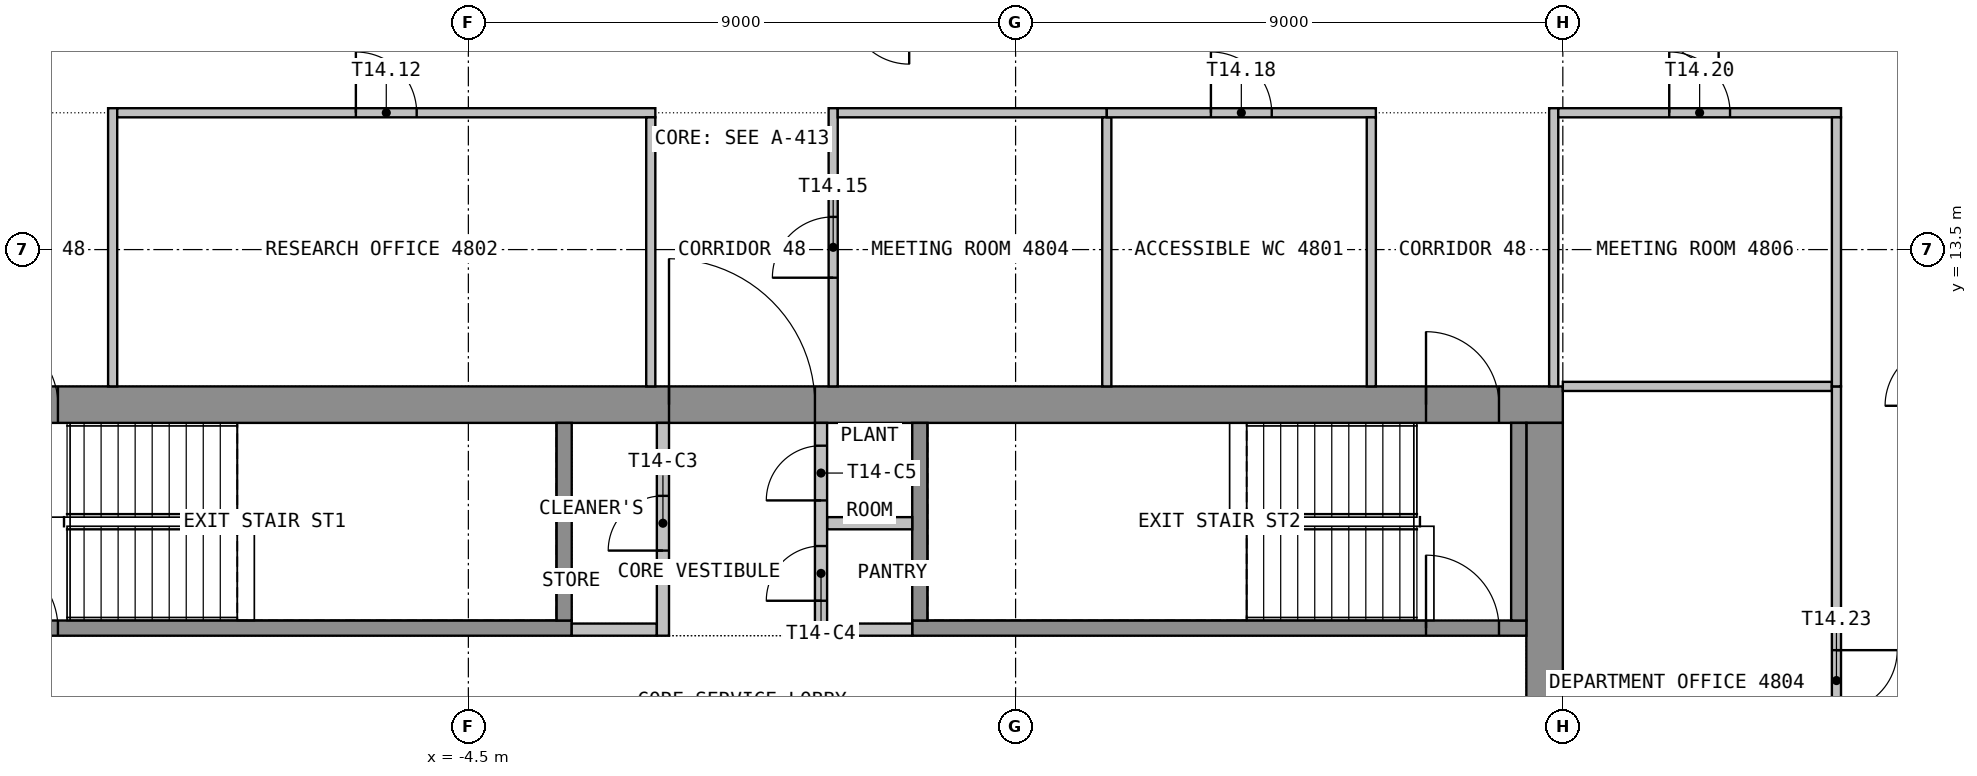
"""IFC4 building model, lengths in metres.
Left out: names, types, materials, properties, quantities, classifications, styles, units other than length and angle.
Written with IfcOpenShell. Run it as: python <this file> out.ifc"""

import sys

from ifc_helpers import new_model, si_unit, direction, frame, frame_2d, origin, place, context, subcontext, project, spatial, rectangle, extrude, element, fill, save


model = new_model("IFC4")
c1 = context("Model", 3, precision=1e-05, world=origin(), true_north=direction((0.0, 1.0)))
c2 = subcontext(c1, "Body", "Model", "MODEL_VIEW")
j1 = project(units=[si_unit("LENGTHUNIT", "METRE"), si_unit("PLANEANGLEUNIT", "RADIAN")], contexts=[c1])
p1 = place(None, origin())
s1 = spatial("IfcSite", under=j1, at=p1, CompositionType="ELEMENT")
p2 = place(p1, origin())
s2 = spatial("IfcBuilding", under=s1, at=p2, CompositionType="ELEMENT")
p3 = place(p2, frame((0.0, 0.0, 195.6)))
s3 = spatial("IfcBuildingStorey", under=s2, at=p3, CompositionType="ELEMENT", Elevation=195.6)
p4 = place(p3, frame((-13.5, 10.95, 0.0), z_axis=(0.0, 0.0, 1.0), x_axis=(1.0, 0.0, 0.0)))
e1 = element("IfcWall", 1, at=p4, inside=s3, PredefinedType="SHEAR", context=c2, shape_type="SweptSolid", body=[
    extrude(rectangle(XDim=27.0, YDim=0.6, at=frame_2d((13.5, 0.0))), origin(), (0.0, 0.0, 1.0), 3.55),
])
p5 = place(p4, frame((12.3, 0.0, 0.0)))
e2 = element("IfcOpeningElement", 2, at=p5, cuts=e1, PredefinedType="OPENING", context=c2, shape_type="SweptSolid", body=[
    extrude(rectangle(XDim=2.4, YDim=2.1, at=frame_2d((1.2, 1.05))), frame((0.0, 0.31, 0.0), z_axis=(0.0, -1.0, 0.0), x_axis=(1.0, 0.0, 0.0)), (0.0, 0.0, 1.0), 0.62),
])
p6 = place(p4, frame((1.05, 0.0, 0.0)))
e3 = element("IfcOpeningElement", 3, at=p6, cuts=e1, PredefinedType="OPENING", context=c2, shape_type="SweptSolid", body=[
    extrude(rectangle(XDim=1.2, YDim=2.1, at=frame_2d((0.6, 1.05))), frame((0.0, 0.31, 0.0), z_axis=(0.0, -1.0, 0.0), x_axis=(1.0, 0.0, 0.0)), (0.0, 0.0, 1.0), 0.62),
])
p7 = place(p4, frame((24.75, 0.0, 0.0)))
e4 = element("IfcOpeningElement", 4, at=p7, cuts=e1, PredefinedType="OPENING", context=c2, shape_type="SweptSolid", body=[
    extrude(rectangle(XDim=1.2, YDim=2.1, at=frame_2d((0.6, 1.05))), frame((0.0, 0.31, 0.0), z_axis=(0.0, -1.0, 0.0), x_axis=(1.0, 0.0, 0.0)), (0.0, 0.0, 1.0), 0.62),
])
p8 = place(p3, frame((13.2, -10.65, 0.0), z_axis=(0.0, 0.0, 1.0), x_axis=(0.0, 1.0, 0.0)))
e5 = element("IfcWall", 5, at=p8, inside=s3, PredefinedType="SHEAR", context=c2, shape_type="SweptSolid", body=[
    extrude(rectangle(XDim=21.3, YDim=0.6, at=frame_2d((10.65, 0.0))), origin(), (0.0, 0.0, 1.0), 3.55),
])
p9 = place(p8, frame((9.45, 0.0, 0.0)))
e6 = element("IfcOpeningElement", 6, at=p9, cuts=e5, PredefinedType="OPENING", context=c2, shape_type="SweptSolid", body=[
    extrude(rectangle(XDim=2.4, YDim=2.1, at=frame_2d((1.2, 1.05))), frame((0.0, 0.31, 0.0), z_axis=(0.0, -1.0, 0.0), x_axis=(1.0, 0.0, 0.0)), (0.0, 0.0, 1.0), 0.62),
])
p10 = place(p3, frame((-12.9, 7.275, 0.0), z_axis=(0.0, 0.0, 1.0), x_axis=(1.0, 0.0, 0.0)))
e7 = element("IfcWall", 7, at=p10, inside=s3, PredefinedType="SHEAR", context=c2, shape_type="SweptSolid", body=[
    extrude(rectangle(XDim=10.1, YDim=0.25, at=frame_2d((5.05, 0.0))), origin(), (0.0, 0.0, 1.0), 3.55),
])
p11 = place(p10, frame((0.45, 0.0, 0.0)))
e8 = element("IfcOpeningElement", 8, at=p11, cuts=e7, PredefinedType="OPENING", context=c2, shape_type="SweptSolid", body=[
    extrude(rectangle(XDim=1.2, YDim=2.1, at=frame_2d((0.6, 1.05))), frame((0.0, 0.135, 0.0), z_axis=(0.0, -1.0, 0.0), x_axis=(1.0, 0.0, 0.0)), (0.0, 0.0, 1.0), 0.27),
])
p12 = place(p3, frame((-2.925, 7.4, 0.0), z_axis=(0.0, 0.0, 1.0), x_axis=(0.0, 1.0, 0.0)))
e9 = element("IfcWall", 9, at=p12, inside=s3, PredefinedType="SHEAR", context=c2, shape_type="SweptSolid", body=[
    extrude(rectangle(XDim=3.25, YDim=0.25, at=frame_2d((1.625, 0.0))), origin(), (0.0, 0.0, 1.0), 3.55),
])
p13 = place(p3, frame((2.8, 7.275, 0.0), z_axis=(0.0, 0.0, 1.0), x_axis=(1.0, 0.0, 0.0)))
e10 = element("IfcWall", 10, at=p13, inside=s3, PredefinedType="SHEAR", context=c2, shape_type="SweptSolid", body=[
    extrude(rectangle(XDim=10.1, YDim=0.25, at=frame_2d((5.05, 0.0))), origin(), (0.0, 0.0, 1.0), 3.55),
])
p14 = place(p13, frame((8.45, 0.0, 0.0)))
e11 = element("IfcOpeningElement", 11, at=p14, cuts=e10, PredefinedType="OPENING", context=c2, shape_type="SweptSolid", body=[
    extrude(rectangle(XDim=1.2, YDim=2.1, at=frame_2d((0.6, 1.05))), frame((0.0, 0.135, 0.0), z_axis=(0.0, -1.0, 0.0), x_axis=(1.0, 0.0, 0.0)), (0.0, 0.0, 1.0), 0.27),
])
for number, where, z_axis, x_axis in (
    (12, (2.925, 7.4, 0.0), (0.0, 0.0, 1.0), (0.0, 1.0, 0.0)),
    (13, (12.775, 7.4, 0.0), (0.0, 0.0, 1.0), (0.0, 1.0, 0.0)),
):
    element("IfcWall", number, at=place(p3, frame(where, z_axis=z_axis, x_axis=x_axis)), inside=s3, PredefinedType="SHEAR", context=c2, shape_type="SweptSolid", body=[
        extrude(rectangle(XDim=3.25, YDim=0.25, at=frame_2d((1.625, 0.0))), origin(), (0.0, 0.0, 1.0), 3.55),
    ])
for number, where, z_axis, x_axis in (
    (14, (-2.8, 7.25, 0.0), (0.0, 0.0, 1.0), (1.0, 0.0, 0.0)),
    (15, (1.4, 7.25, 0.0), (0.0, 0.0, 1.0), (1.0, 0.0, 0.0)),
    (16, (1.4, 9.0, 0.0), (0.0, 0.0, 1.0), (1.0, 0.0, 0.0)),
):
    element("IfcWall", number, at=place(p3, frame(where, z_axis=z_axis, x_axis=x_axis)), inside=s3, PredefinedType="PARTITIONING", context=c2, shape_type="SweptSolid", body=[
        extrude(rectangle(XDim=1.4, YDim=0.2, at=frame_2d((0.7, 0.0))), origin(), (0.0, 0.0, 1.0), 3.55),
    ])
p15 = place(p3, frame((-1.3, 7.15, 0.0), z_axis=(0.0, 0.0, 1.0), x_axis=(0.0, 1.0, 0.0)))
e17 = element("IfcWall", 17, at=p15, inside=s3, PredefinedType="PARTITIONING", context=c2, shape_type="SweptSolid", body=[
    extrude(rectangle(XDim=3.5, YDim=0.2, at=frame_2d((1.75, 0.0))), origin(), (0.0, 0.0, 1.0), 3.55),
])
p16 = place(p15, frame((1.4, 0.0, 0.0)))
e18 = element("IfcOpeningElement", 18, at=p16, cuts=e17, PredefinedType="OPENING", context=c2, shape_type="SweptSolid", body=[
    extrude(rectangle(XDim=0.9, YDim=2.1, at=frame_2d((0.45, 1.05))), frame((0.0, 0.11, 0.0), z_axis=(0.0, -1.0, 0.0), x_axis=(1.0, 0.0, 0.0)), (0.0, 0.0, 1.0), 0.22),
])
p17 = place(p3, frame((1.3, 7.15, 0.0), z_axis=(0.0, 0.0, 1.0), x_axis=(0.0, 1.0, 0.0)))
e19 = element("IfcWall", 19, at=p17, inside=s3, PredefinedType="PARTITIONING", context=c2, shape_type="SweptSolid", body=[
    extrude(rectangle(XDim=3.5, YDim=0.2, at=frame_2d((1.75, 0.0))), origin(), (0.0, 0.0, 1.0), 3.55),
])
p18 = place(p17, frame((0.575, 0.0, 0.0)))
e20 = element("IfcOpeningElement", 20, at=p18, cuts=e19, PredefinedType="OPENING", context=c2, shape_type="SweptSolid", body=[
    extrude(rectangle(XDim=0.9, YDim=2.1, at=frame_2d((0.45, 1.05))), frame((0.0, 0.11, 0.0), z_axis=(0.0, -1.0, 0.0), x_axis=(1.0, 0.0, 0.0)), (0.0, 0.0, 1.0), 0.22),
])
p19 = place(p17, frame((2.225, 0.0, 0.0)))
e21 = element("IfcOpeningElement", 21, at=p19, cuts=e19, PredefinedType="OPENING", context=c2, shape_type="SweptSolid", body=[
    extrude(rectangle(XDim=0.9, YDim=2.1, at=frame_2d((0.45, 1.05))), frame((0.0, 0.11, 0.0), z_axis=(0.0, -1.0, 0.0), x_axis=(1.0, 0.0, 0.0)), (0.0, 0.0, 1.0), 0.22),
])
p20 = place(p3, frame((-10.35, 11.25, 0.0), z_axis=(0.0, 0.0, 1.0), x_axis=(0.0, 1.0, 0.0)))
e22 = element("IfcWall", 22, at=p20, inside=s3, PredefinedType="PARTITIONING", context=c2, shape_type="SweptSolid", body=[
    extrude(rectangle(XDim=4.575, YDim=0.15, at=frame_2d((2.288, 0.0))), origin(), (0.0, 0.0, 1.0), 3.55),
])
p21 = place(p3, frame((-10.275, 15.75, 0.0), z_axis=(0.0, 0.0, 1.0), x_axis=(1.0, 0.0, 0.0)))
e23 = element("IfcWall", 23, at=p21, inside=s3, PredefinedType="PARTITIONING", context=c2, shape_type="SweptSolid", body=[
    extrude(rectangle(XDim=8.85, YDim=0.15, at=frame_2d((4.425, 0.0))), origin(), (0.0, 0.0, 1.0), 3.55),
])
p22 = place(p21, frame((3.925, 0.0, 0.0)))
e24 = element("IfcOpeningElement", 24, at=p22, cuts=e23, PredefinedType="OPENING", context=c2, shape_type="SweptSolid", body=[
    extrude(rectangle(XDim=1.0, YDim=2.1, at=frame_2d((0.5, 1.05))), frame((0.0, 0.085, 0.0), z_axis=(0.0, -1.0, 0.0), x_axis=(1.0, 0.0, 0.0)), (0.0, 0.0, 1.0), 0.17),
])
p23 = place(p3, frame((-1.5, 15.675, 0.0), z_axis=(0.0, 0.0, 1.0), x_axis=(0.0, -1.0, 0.0)))
e25 = element("IfcWall", 25, at=p23, inside=s3, PredefinedType="PARTITIONING", context=c2, shape_type="SweptSolid", body=[
    extrude(rectangle(XDim=4.425, YDim=0.15, at=frame_2d((2.212, 0.0))), origin(), (0.0, 0.0, 1.0), 3.55),
])
p24 = place(p3, frame((1.5, 11.25, 0.0), z_axis=(0.0, 0.0, 1.0), x_axis=(0.0, 1.0, 0.0)))
e26 = element("IfcWall", 26, at=p24, inside=s3, PredefinedType="PARTITIONING", context=c2, shape_type="SweptSolid", body=[
    extrude(rectangle(XDim=4.575, YDim=0.15, at=frame_2d((2.288, 0.0))), origin(), (0.0, 0.0, 1.0), 3.55),
])
p25 = place(p24, frame((1.788, 0.0, 0.0)))
e27 = element("IfcOpeningElement", 27, at=p25, cuts=e26, PredefinedType="OPENING", context=c2, shape_type="SweptSolid", body=[
    extrude(rectangle(XDim=1.0, YDim=2.1, at=frame_2d((0.5, 1.05))), frame((0.0, 0.085, 0.0), z_axis=(0.0, -1.0, 0.0), x_axis=(1.0, 0.0, 0.0)), (0.0, 0.0, 1.0), 0.17),
])
for number, where, z_axis, x_axis in (
    (28, (1.575, 15.75, 0.0), (0.0, 0.0, 1.0), (1.0, 0.0, 0.0)),
    (29, (6.0, 15.675, 0.0), (0.0, 0.0, 1.0), (0.0, -1.0, 0.0)),
):
    element("IfcWall", number, at=place(p3, frame(where, z_axis=z_axis, x_axis=x_axis)), inside=s3, PredefinedType="PARTITIONING", context=c2, shape_type="SweptSolid", body=[
        extrude(rectangle(XDim=4.425, YDim=0.15, at=frame_2d((2.212, 0.0))), origin(), (0.0, 0.0, 1.0), 3.55),
    ])
p26 = place(p3, frame((6.0, 15.75, 0.0), z_axis=(0.0, 0.0, 1.0), x_axis=(1.0, 0.0, 0.0)))
e30 = element("IfcWall", 30, at=p26, inside=s3, PredefinedType="PARTITIONING", context=c2, shape_type="SweptSolid", body=[
    extrude(rectangle(XDim=4.425, YDim=0.15, at=frame_2d((2.212, 0.0))), origin(), (0.0, 0.0, 1.0), 3.55),
])
p27 = place(p26, frame((1.712, 0.0, 0.0)))
e31 = element("IfcOpeningElement", 31, at=p27, cuts=e30, PredefinedType="OPENING", context=c2, shape_type="SweptSolid", body=[
    extrude(rectangle(XDim=1.0, YDim=2.1, at=frame_2d((0.5, 1.05))), frame((0.0, 0.085, 0.0), z_axis=(0.0, -1.0, 0.0), x_axis=(1.0, 0.0, 0.0)), (0.0, 0.0, 1.0), 0.17),
])
p28 = place(p3, frame((10.35, 15.675, 0.0), z_axis=(0.0, 0.0, 1.0), x_axis=(0.0, -1.0, 0.0)))
e32 = element("IfcWall", 32, at=p28, inside=s3, PredefinedType="PARTITIONING", context=c2, shape_type="SweptSolid", body=[
    extrude(rectangle(XDim=4.425, YDim=0.15, at=frame_2d((2.212, 0.0))), origin(), (0.0, 0.0, 1.0), 3.55),
])
p29 = place(p3, frame((13.35, 11.25, 0.0), z_axis=(0.0, 0.0, 1.0), x_axis=(0.0, 1.0, 0.0)))
e33 = element("IfcWall", 33, at=p29, inside=s3, PredefinedType="PARTITIONING", context=c2, shape_type="SweptSolid", body=[
    extrude(rectangle(XDim=4.575, YDim=0.15, at=frame_2d((2.288, 0.0))), origin(), (0.0, 0.0, 1.0), 3.55),
])
p30 = place(p3, frame((13.425, 15.75, 0.0), z_axis=(0.0, 0.0, 1.0), x_axis=(1.0, 0.0, 0.0)))
e34 = element("IfcWall", 34, at=p30, inside=s3, PredefinedType="PARTITIONING", context=c2, shape_type="SweptSolid", body=[
    extrude(rectangle(XDim=4.65, YDim=0.15, at=frame_2d((2.325, 0.0))), origin(), (0.0, 0.0, 1.0), 3.55),
])
p31 = place(p30, frame((1.825, 0.0, 0.0)))
e35 = element("IfcOpeningElement", 35, at=p31, cuts=e34, PredefinedType="OPENING", context=c2, shape_type="SweptSolid", body=[
    extrude(rectangle(XDim=1.0, YDim=2.1, at=frame_2d((0.5, 1.05))), frame((0.0, 0.085, 0.0), z_axis=(0.0, -1.0, 0.0), x_axis=(1.0, 0.0, 0.0)), (0.0, 0.0, 1.0), 0.17),
])
p32 = place(p3, frame((17.925, 11.25, 0.0), z_axis=(0.0, 0.0, 1.0), x_axis=(-1.0, 0.0, 0.0)))
e36 = element("IfcWall", 36, at=p32, inside=s3, PredefinedType="PARTITIONING", context=c2, shape_type="SweptSolid", body=[
    extrude(rectangle(XDim=4.425, YDim=0.15, at=frame_2d((2.212, 0.0))), origin(), (0.0, 0.0, 1.0), 3.55),
])
p33 = place(p3, frame((18.0, 11.25, 0.0), z_axis=(0.0, 0.0, 1.0), x_axis=(0.0, -1.0, 0.0)))
e37 = element("IfcWall", 37, at=p33, inside=s3, PredefinedType="PARTITIONING", context=c2, shape_type="SweptSolid", body=[
    extrude(rectangle(XDim=9.675, YDim=0.15, at=frame_2d((4.837, 0.0))), origin(), (0.0, 0.0, 1.0), 3.55),
])
p34 = place(p33, frame((4.337, 0.0, 0.0)))
e38 = element("IfcOpeningElement", 38, at=p34, cuts=e37, PredefinedType="OPENING", context=c2, shape_type="SweptSolid", body=[
    extrude(rectangle(XDim=1.0, YDim=2.1, at=frame_2d((0.5, 1.05))), frame((0.0, 0.085, 0.0), z_axis=(0.0, -1.0, 0.0), x_axis=(1.0, 0.0, 0.0)), (0.0, 0.0, 1.0), 0.17),
])
p35 = place(p3, frame((18.0, 15.675, 0.0), z_axis=(0.0, 0.0, 1.0), x_axis=(0.0, -1.0, 0.0)))
e39 = element("IfcWall", 39, at=p35, inside=s3, PredefinedType="PARTITIONING", context=c2, shape_type="SweptSolid", body=[
    extrude(rectangle(XDim=4.425, YDim=0.15, at=frame_2d((2.212, 0.0))), origin(), (0.0, 0.0, 1.0), 3.55),
])
p36 = place(p5, origin())
e40 = element("IfcDoor", 40, at=p36, inside=s3, OperationType="DOUBLE_DOOR_DOUBLE_SWING", PredefinedType="DOOR", context=c2, shape_type="SweptSolid", body=[
    extrude(rectangle(XDim=2.4, YDim=2.1, at=frame_2d((1.2, 1.05))), frame((0.0, 0.025, 0.0), z_axis=(0.0, -1.0, 0.0), x_axis=(1.0, 0.0, 0.0)), (0.0, 0.0, 1.0), 0.05),
])
fill(e2, e40)
p37 = place(p6, origin())
e41 = element("IfcDoor", 41, at=p37, inside=s3, OperationType="SINGLE_SWING_RIGHT", PredefinedType="DOOR", context=c2, shape_type="SweptSolid", body=[
    extrude(rectangle(XDim=1.2, YDim=2.1, at=frame_2d((0.6, 1.05))), frame((0.0, 0.025, 0.0), z_axis=(0.0, -1.0, 0.0), x_axis=(1.0, 0.0, 0.0)), (0.0, 0.0, 1.0), 0.05),
])
fill(e3, e41)
p38 = place(p7, origin())
e42 = element("IfcDoor", 42, at=p38, inside=s3, OperationType="SINGLE_SWING_RIGHT", PredefinedType="DOOR", context=c2, shape_type="SweptSolid", body=[
    extrude(rectangle(XDim=1.2, YDim=2.1, at=frame_2d((0.6, 1.05))), frame((0.0, 0.025, 0.0), z_axis=(0.0, -1.0, 0.0), x_axis=(1.0, 0.0, 0.0)), (0.0, 0.0, 1.0), 0.05),
])
fill(e4, e42)
p39 = place(p11, origin())
e43 = element("IfcDoor", 43, at=p39, inside=s3, OperationType="SINGLE_SWING_LEFT", PredefinedType="DOOR", context=c2, shape_type="SweptSolid", body=[
    extrude(rectangle(XDim=1.2, YDim=2.1, at=frame_2d((0.6, 1.05))), frame((0.0, 0.025, 0.0), z_axis=(0.0, -1.0, 0.0), x_axis=(1.0, 0.0, 0.0)), (0.0, 0.0, 1.0), 0.05),
])
fill(e8, e43)
p40 = place(p14, origin())
e44 = element("IfcDoor", 44, at=p40, inside=s3, OperationType="SINGLE_SWING_LEFT", PredefinedType="DOOR", context=c2, shape_type="SweptSolid", body=[
    extrude(rectangle(XDim=1.2, YDim=2.1, at=frame_2d((0.6, 1.05))), frame((0.0, 0.025, 0.0), z_axis=(0.0, -1.0, 0.0), x_axis=(1.0, 0.0, 0.0)), (0.0, 0.0, 1.0), 0.05),
])
fill(e11, e44)
p41 = place(p16, origin())
e45 = element("IfcDoor", 45, at=p41, inside=s3, OperationType="SINGLE_SWING_LEFT", PredefinedType="DOOR", context=c2, shape_type="SweptSolid", body=[
    extrude(rectangle(XDim=0.9, YDim=2.1, at=frame_2d((0.45, 1.05))), frame((0.0, 0.025, 0.0), z_axis=(0.0, -1.0, 0.0), x_axis=(1.0, 0.0, 0.0)), (0.0, 0.0, 1.0), 0.05),
])
fill(e18, e45)
p42 = place(p18, origin())
e46 = element("IfcDoor", 46, at=p42, inside=s3, OperationType="SINGLE_SWING_LEFT", PredefinedType="DOOR", context=c2, shape_type="SweptSolid", body=[
    extrude(rectangle(XDim=0.9, YDim=2.1, at=frame_2d((0.45, 1.05))), frame((0.0, 0.025, 0.0), z_axis=(0.0, -1.0, 0.0), x_axis=(1.0, 0.0, 0.0)), (0.0, 0.0, 1.0), 0.05),
])
fill(e20, e46)
p43 = place(p19, origin())
e47 = element("IfcDoor", 47, at=p43, inside=s3, OperationType="SINGLE_SWING_LEFT", PredefinedType="DOOR", context=c2, shape_type="SweptSolid", body=[
    extrude(rectangle(XDim=0.9, YDim=2.1, at=frame_2d((0.45, 1.05))), frame((0.0, 0.025, 0.0), z_axis=(0.0, -1.0, 0.0), x_axis=(1.0, 0.0, 0.0)), (0.0, 0.0, 1.0), 0.05),
])
fill(e21, e47)
p44 = place(p22, origin())
e48 = element("IfcDoor", 48, at=p44, inside=s3, OperationType="SINGLE_SWING_RIGHT", PredefinedType="DOOR", context=c2, shape_type="SweptSolid", body=[
    extrude(rectangle(XDim=1.0, YDim=2.1, at=frame_2d((0.5, 1.05))), frame((0.0, 0.025, 0.0), z_axis=(0.0, -1.0, 0.0), x_axis=(1.0, 0.0, 0.0)), (0.0, 0.0, 1.0), 0.05),
])
fill(e24, e48)
p45 = place(p25, origin())
e49 = element("IfcDoor", 49, at=p45, inside=s3, OperationType="SINGLE_SWING_LEFT", PredefinedType="DOOR", context=c2, shape_type="SweptSolid", body=[
    extrude(rectangle(XDim=1.0, YDim=2.1, at=frame_2d((0.5, 1.05))), frame((0.0, 0.025, 0.0), z_axis=(0.0, -1.0, 0.0), x_axis=(1.0, 0.0, 0.0)), (0.0, 0.0, 1.0), 0.05),
])
fill(e27, e49)
p46 = place(p27, origin())
e50 = element("IfcDoor", 50, at=p46, inside=s3, OperationType="SINGLE_SWING_LEFT", PredefinedType="DOOR", context=c2, shape_type="SweptSolid", body=[
    extrude(rectangle(XDim=1.0, YDim=2.1, at=frame_2d((0.5, 1.05))), frame((0.0, 0.025, 0.0), z_axis=(0.0, -1.0, 0.0), x_axis=(1.0, 0.0, 0.0)), (0.0, 0.0, 1.0), 0.05),
])
fill(e31, e50)
p47 = place(p31, origin())
e51 = element("IfcDoor", 51, at=p47, inside=s3, OperationType="SINGLE_SWING_LEFT", PredefinedType="DOOR", context=c2, shape_type="SweptSolid", body=[
    extrude(rectangle(XDim=1.0, YDim=2.1, at=frame_2d((0.5, 1.05))), frame((0.0, 0.025, 0.0), z_axis=(0.0, -1.0, 0.0), x_axis=(1.0, 0.0, 0.0)), (0.0, 0.0, 1.0), 0.05),
])
fill(e35, e51)
p48 = place(p34, origin())
e52 = element("IfcDoor", 52, at=p48, inside=s3, OperationType="SINGLE_SWING_LEFT", PredefinedType="DOOR", context=c2, shape_type="SweptSolid", body=[
    extrude(rectangle(XDim=1.0, YDim=2.1, at=frame_2d((0.5, 1.05))), frame((0.0, 0.025, 0.0), z_axis=(0.0, -1.0, 0.0), x_axis=(1.0, 0.0, 0.0)), (0.0, 0.0, 1.0), 0.05),
])
fill(e38, e52)
save(model, sys.argv[1])
